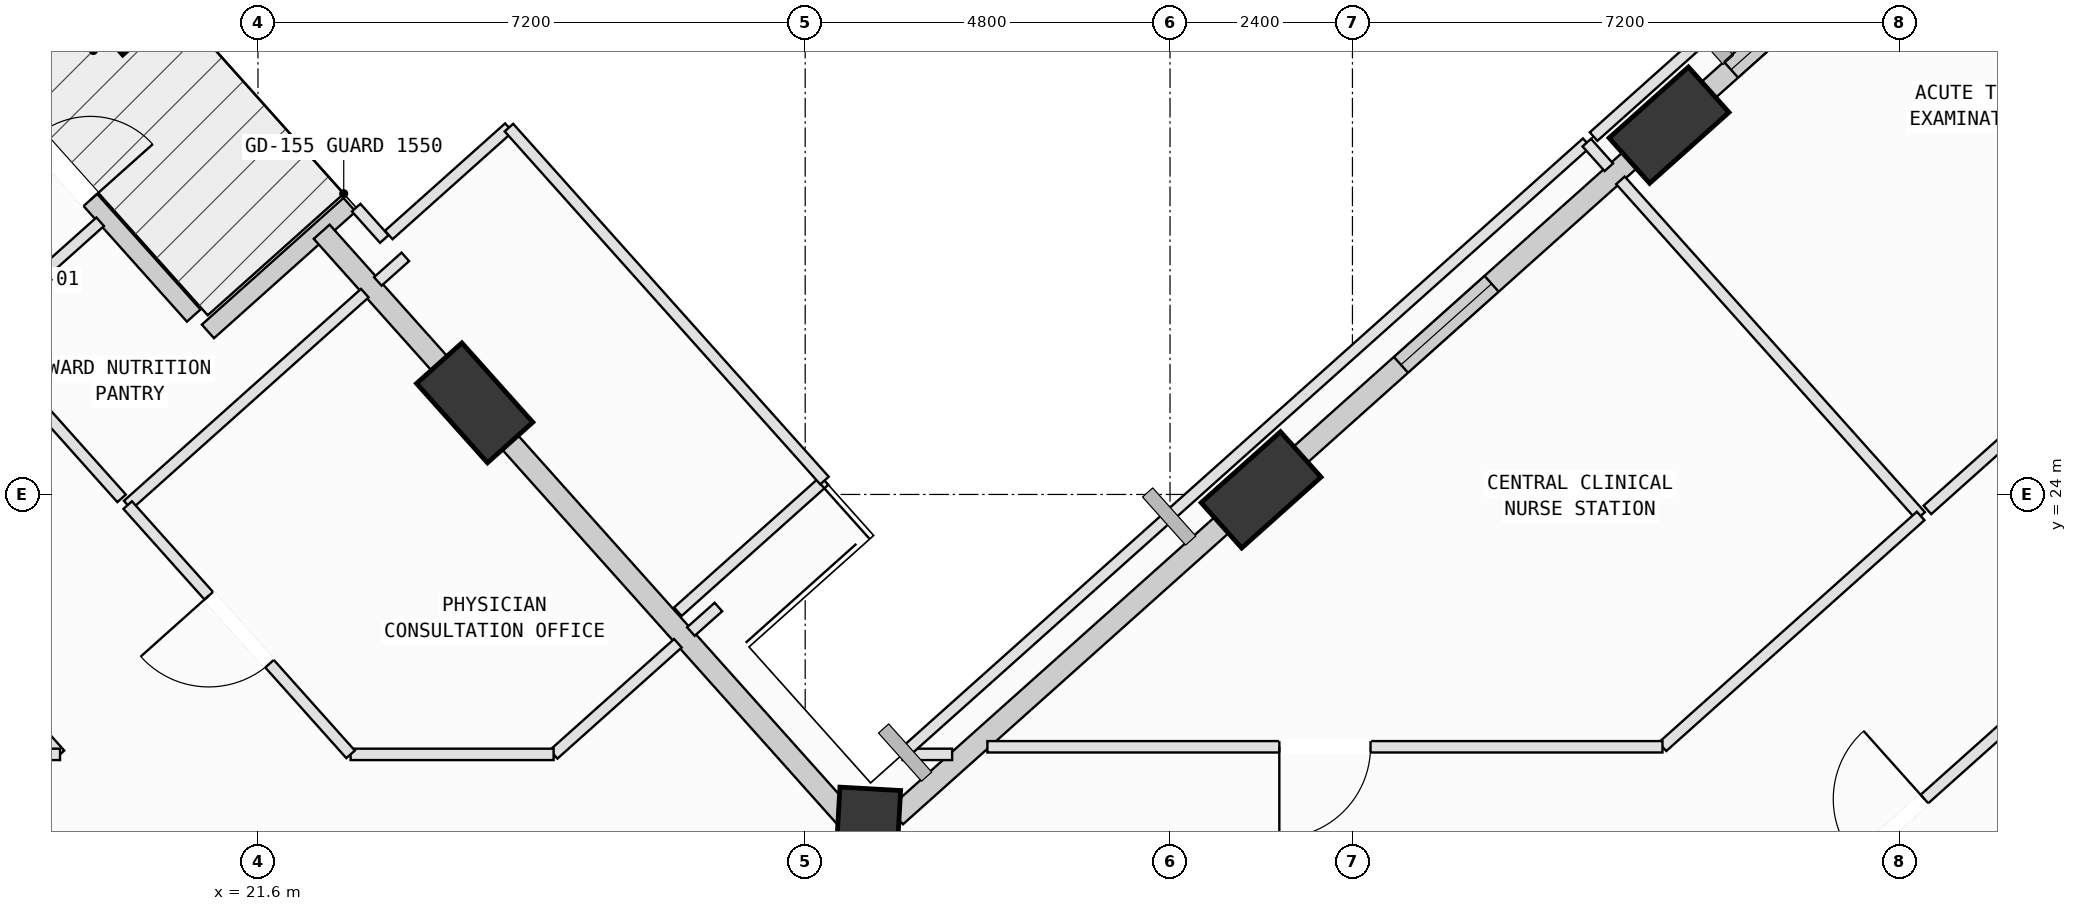
"""IFC4 building model, lengths in metres.
Left out: names, types, materials, properties, quantities, classifications, styles, units other than length and angle.
Written with IfcOpenShell. Run it as: python <this file> out.ifc"""

import sys

from ifc_helpers import new_model, si_unit, direction, frame, frame_2d, origin, origin_2d, place, context, subcontext, project, spatial, rectangle, extrude, element, fill, save


model = new_model("IFC4")
c1 = context("Model", 3, precision=1e-05, world=origin(), true_north=direction((0.0, 1.0)))
c2 = subcontext(c1, "Body", "Model", "MODEL_VIEW")
j1 = project(units=[si_unit("LENGTHUNIT", "METRE"), si_unit("PLANEANGLEUNIT", "RADIAN")], contexts=[c1])
p1 = place(None, origin())
s1 = spatial("IfcSite", under=j1, at=p1, CompositionType="ELEMENT")
p2 = place(p1, origin())
s2 = spatial("IfcBuilding", under=s1, at=p2, CompositionType="ELEMENT")
p3 = place(p2, frame((0.0, 0.0, 201.8)))
s3 = spatial("IfcBuildingStorey", under=s2, at=p3, CompositionType="ELEMENT", Elevation=201.8)
p4 = place(p3, frame((40.165, 28.859, 0.002), z_axis=(-0.017020693495, 0.027036480641, 0.999489532065), x_axis=(-0.275948140466, -0.960936612332, 0.021294385498)))
e1 = element("IfcColumn", 1, at=p4, inside=s3, PredefinedType="COLUMN", context=c2, shape_type="SweptSolid", body=[
    extrude(rectangle(XDim=1.4, YDim=0.8, at=origin_2d()), origin(), (0.0, 0.0, 1.0), 3.973),
])
p5 = place(p3, frame((34.798, 24.06, 0.002), z_axis=(0.002997258286, 0.004954651452, 0.999983233795), x_axis=(-0.982837456403, -0.184433286373, 0.003859685072)))
e2 = element("IfcColumn", 2, at=p5, inside=s3, PredefinedType="COLUMN", context=c2, shape_type="SweptSolid", body=[
    extrude(rectangle(XDim=1.4, YDim=0.8, at=origin_2d()), origin(), (0.0, 0.0, 1.0), 3.991),
])
p6 = place(p3, frame((29.617, 19.428, 0.002), z_axis=(0.022404649065, -0.016327771648, 0.999615643922), x_axis=(-0.773714259991, 0.632929754663, 0.027679767862)))
e3 = element("IfcColumn", 3, at=p6, inside=s3, PredefinedType="COLUMN", context=c2, shape_type="SweptSolid", body=[
    extrude(rectangle(XDim=1.4, YDim=0.8, at=origin_2d()), origin(), (0.0, 0.0, 1.0), 3.977),
])
p7 = place(p3, frame((24.451, 25.205, 0.002), z_axis=(-0.001414889016, -0.037894418868, 0.999280746891), x_axis=(-0.63827340517, 0.769290530465, 0.028269064174)))
e4 = element("IfcColumn", 4, at=p7, inside=s3, PredefinedType="COLUMN", context=c2, shape_type="SweptSolid", body=[
    extrude(rectangle(XDim=1.4, YDim=0.8, at=origin_2d()), origin(), (0.0, 0.0, 1.0), 3.969),
])
p8 = place(p3, frame((19.652, 30.573, 0.002), z_axis=(-0.023400018173, -0.057851759968, 0.998050907027), x_axis=(-0.338913817556, 0.939666525529, 0.046521447421)))
e5 = element("IfcColumn", 5, at=p8, inside=s3, PredefinedType="COLUMN", context=c2, shape_type="SweptSolid", body=[
    extrude(rectangle(XDim=1.4, YDim=0.8, at=origin_2d()), origin(), (0.0, 0.0, 1.0), 3.954),
])
p9 = place(p3, frame((16.116, 31.542, 0.0), z_axis=(0.0, 0.0, 1.0), x_axis=(0.666505663581, -0.745499966743, 0.0)))
e6 = element("IfcWall", 6, at=p9, inside=s3, PredefinedType="SOLIDWALL", context=c2, shape_type="SweptSolid", body=[
    extrude(rectangle(XDim=6.96, YDim=0.24, at=frame_2d((3.48, 0.0))), origin(), (0.0, 0.0, 1.0), 3.185),
])
p10 = place(p9, frame((3.82, 0.0, 0.0)))
e7 = element("IfcOpeningElement", 7, at=p10, cuts=e6, PredefinedType="OPENING", context=c2, shape_type="SweptSolid", body=[
    extrude(rectangle(XDim=1.1, YDim=2.15, at=frame_2d((0.55, 1.075))), frame((0.0, 0.13, 0.0), z_axis=(0.0, -1.0, 0.0), x_axis=(1.0, 0.0, 0.0)), (0.0, 0.0, 1.0), 0.26),
])
p11 = place(p3, frame((20.942, 26.145, 0.0), z_axis=(0.0, 0.0, 1.0), x_axis=(0.745504325209, 0.666500788518, 0.0)))
e8 = element("IfcWall", 8, at=p11, inside=s3, PredefinedType="SOLIDWALL", context=c2, shape_type="SweptSolid", body=[
    extrude(rectangle(XDim=2.5, YDim=0.24, at=frame_2d((1.25, 0.0))), origin(), (0.0, 0.0, 1.0), 3.185),
])
p12 = place(p3, frame((40.54, 29.194, 0.0), z_axis=(0.0, 0.0, 1.0), x_axis=(0.745469957375, 0.666539228141, 0.0)))
e9 = element("IfcWall", 9, at=p12, inside=s3, PredefinedType="SOLIDWALL", context=c2, shape_type="SweptSolid", body=[
    extrude(rectangle(XDim=6.226, YDim=0.28, at=frame_2d((3.113, 0.0))), origin(), (0.0, 0.0, 1.0), 2.985),
])
p13 = place(p12, frame((2.51, 0.0, 0.75)))
e10 = element("IfcOpeningElement", 10, at=p13, cuts=e9, PredefinedType="OPENING", context=c2, shape_type="SweptSolid", body=[
    extrude(rectangle(XDim=1.2, YDim=1.75, at=frame_2d((0.6, 0.875))), frame((0.0, 0.15, 0.0), z_axis=(0.0, -1.0, 0.0), x_axis=(1.0, 0.0, 0.0)), (0.0, 0.0, 1.0), 0.3),
])
p14 = place(p12, frame((0.591, 0.0, 0.75)))
e11 = element("IfcOpeningElement", 11, at=p14, cuts=e9, PredefinedType="OPENING", context=c2, shape_type="SweptSolid", body=[
    extrude(rectangle(XDim=1.2, YDim=1.75, at=frame_2d((0.6, 0.875))), frame((0.0, 0.15, 0.0), z_axis=(0.0, -1.0, 0.0), x_axis=(1.0, 0.0, 0.0)), (0.0, 0.0, 1.0), 0.3),
])
p15 = place(p3, frame((35.176, 24.398, 0.0), z_axis=(0.0, 0.0, 1.0), x_axis=(0.745469496109, 0.66653974403, 0.0)))
e12 = element("IfcWall", 12, at=p15, inside=s3, PredefinedType="SOLIDWALL", context=c2, shape_type="SweptSolid", body=[
    extrude(rectangle(XDim=6.211, YDim=0.28, at=frame_2d((3.105, 0.0))), origin(), (0.0, 0.0, 1.0), 3.185),
])
p16 = place(p15, frame((1.961, 0.0, 0.75)))
e13 = element("IfcOpeningElement", 13, at=p16, cuts=e12, PredefinedType="OPENING", context=c2, shape_type="SweptSolid", body=[
    extrude(rectangle(XDim=1.6, YDim=1.95, at=frame_2d((0.8, 0.975))), frame((0.0, 0.15, 0.0), z_axis=(0.0, -1.0, 0.0), x_axis=(1.0, 0.0, 0.0)), (0.0, 0.0, 1.0), 0.3),
])
p17 = place(p3, frame((29.993, 19.764, 0.0), z_axis=(0.0, 0.0, 1.0), x_axis=(0.745473758076, 0.666534977341, 0.0)))
e14 = element("IfcWall", 14, at=p17, inside=s3, PredefinedType="SOLIDWALL", context=c2, shape_type="SweptSolid", body=[
    extrude(rectangle(XDim=5.96, YDim=0.28, at=frame_2d((2.98, 0.0))), origin(), (0.0, 0.0, 1.0), 2.985),
])
p18 = place(p3, frame((29.323, 19.757, 0.0), z_axis=(0.0, 0.0, 1.0), x_axis=(-0.666530903335, 0.745477400663, 0.0)))
e15 = element("IfcWall", 15, at=p18, inside=s3, PredefinedType="SOLIDWALL", context=c2, shape_type="SweptSolid", body=[
    extrude(rectangle(XDim=6.76, YDim=0.28, at=frame_2d((3.38, 0.0))), origin(), (0.0, 0.0, 1.0), 3.185),
])
p19 = place(p3, frame((24.159, 25.532, 0.0), z_axis=(0.0, 0.0, 1.0), x_axis=(-0.666515579079, 0.745491101788, 0.0)))
e16 = element("IfcWall", 16, at=p19, inside=s3, PredefinedType="SOLIDWALL", context=c2, shape_type="SweptSolid", body=[
    extrude(rectangle(XDim=2.581, YDim=0.28, at=frame_2d((1.291, 0.0))), origin(), (0.0, 0.0, 1.0), 3.185),
])
p20 = place(p3, frame((38.516, 15.513, 0.0), z_axis=(0.0, 0.0, 1.0), x_axis=(0.745456187518, 0.666554628287, 0.0)))
e17 = element("IfcWall", 17, at=p20, inside=s3, PredefinedType="PARTITIONING", context=c2, shape_type="SweptSolid", body=[
    extrude(rectangle(XDim=12.241, YDim=0.15, at=frame_2d((6.12, 0.0))), origin(), (0.0, 0.0, 1.0), 3.7),
])
p21 = place(p20, frame((5.521, 0.0, 0.0)))
e18 = element("IfcOpeningElement", 18, at=p21, cuts=e17, PredefinedType="OPENING", context=c2, shape_type="SweptSolid", body=[
    extrude(rectangle(XDim=1.2, YDim=2.15, at=frame_2d((0.6, 1.075))), frame((0.0, 0.085, 0.0), z_axis=(0.0, -1.0, 0.0), x_axis=(1.0, 0.0, 0.0)), (0.0, 0.0, 1.0), 0.17),
])
p22 = place(p3, frame((12.256, 28.118, 0.0), z_axis=(0.0, 0.0, 1.0), x_axis=(0.666553455148, -0.745457236487, 0.0)))
e19 = element("IfcWall", 19, at=p22, inside=s3, PredefinedType="PARTITIONING", context=c2, shape_type="SweptSolid", body=[
    extrude(rectangle(XDim=10.112, YDim=0.15, at=frame_2d((5.056, 0.0))), origin(), (0.0, 0.0, 1.0), 3.7),
])
p23 = place(p22, frame((4.456, 0.0, 0.0)))
e20 = element("IfcOpeningElement", 20, at=p23, cuts=e19, PredefinedType="OPENING", context=c2, shape_type="SweptSolid", body=[
    extrude(rectangle(XDim=1.2, YDim=2.15, at=frame_2d((0.6, 1.075))), frame((0.0, 0.085, 0.0), z_axis=(0.0, -1.0, 0.0), x_axis=(1.0, 0.0, 0.0)), (0.0, 0.0, 1.0), 0.17),
])
p24 = place(p3, frame((18.996, 20.58, 0.0), z_axis=(0.0, 0.0, 1.0), x_axis=(-1.0, 0.0, 0.0)))
e21 = element("IfcWall", 21, at=p24, inside=s3, PredefinedType="PARTITIONING", context=c2, shape_type="SweptSolid", body=[
    extrude(rectangle(XDim=3.999, YDim=0.15, at=frame_2d((2.0, 0.0))), origin(), (0.0, 0.0, 1.0), 3.7),
])
p25 = place(p3, frame((30.733, 20.58, 0.0), z_axis=(0.0, 0.0, 1.0), x_axis=(-1.0, 0.0, 0.0)))
e22 = element("IfcWall", 22, at=p25, inside=s3, PredefinedType="PARTITIONING", context=c2, shape_type="SweptSolid", body=[
    extrude(rectangle(XDim=0.653, YDim=0.15, at=frame_2d((0.326, 0.0))), origin(), (0.0, 0.0, 1.0), 3.7),
])
p26 = place(p3, frame((30.08, 20.58, 0.0), z_axis=(0.0, 0.0, 1.0), x_axis=(0.745505625265, 0.666499334357, 0.0)))
e23 = element("IfcWall", 23, at=p26, inside=s3, PredefinedType="PARTITIONING", context=c2, shape_type="SweptSolid", body=[
    extrude(rectangle(XDim=12.076, YDim=0.15, at=frame_2d((6.038, 0.0))), origin(), (0.0, 0.0, 1.0), 3.7),
])
p27 = place(p3, frame((39.083, 28.629, 0.0), z_axis=(0.0, 0.0, 1.0), x_axis=(0.667008184931, -0.745050388387, 0.0)))
e24 = element("IfcWall", 24, at=p27, inside=s3, PredefinedType="PARTITIONING", context=c2, shape_type="SweptSolid", body=[
    extrude(rectangle(XDim=0.435, YDim=0.15, at=frame_2d((0.217, 0.0))), origin(), (0.0, 0.0, 1.0), 3.7),
])
p28 = place(p3, frame((39.526, 28.133, 0.0), z_axis=(0.0, 0.0, 1.0), x_axis=(0.666703315067, -0.745323211553, 0.0)))
e25 = element("IfcWall", 25, at=p28, inside=s3, PredefinedType="PARTITIONING", context=c2, shape_type="SweptSolid", body=[
    extrude(rectangle(XDim=5.925, YDim=0.15, at=frame_2d((2.962, 0.0))), origin(), (0.0, 0.0, 1.0), 3.7),
])
p29 = place(p3, frame((43.476, 23.717, 0.0), z_axis=(0.0, 0.0, 1.0), x_axis=(-0.745490689722, -0.66651603997, 0.0)))
e26 = element("IfcWall", 26, at=p29, inside=s3, PredefinedType="PARTITIONING", context=c2, shape_type="SweptSolid", body=[
    extrude(rectangle(XDim=4.557, YDim=0.15, at=frame_2d((2.278, 0.0))), origin(), (0.0, 0.0, 1.0), 3.7),
])
p30 = place(p3, frame((40.079, 20.68, 0.0), z_axis=(0.0, 0.0, 1.0), x_axis=(-1.0, 0.0, 0.0)))
e27 = element("IfcWall", 27, at=p30, inside=s3, PredefinedType="PARTITIONING", context=c2, shape_type="SweptSolid", body=[
    extrude(rectangle(XDim=8.882, YDim=0.15, at=frame_2d((4.441, 0.0))), origin(), (0.0, 0.0, 1.0), 3.7),
])
p31 = place(p30, frame((3.841, 0.0, 0.0)))
e28 = element("IfcOpeningElement", 28, at=p31, cuts=e27, PredefinedType="OPENING", context=c2, shape_type="SweptSolid", body=[
    extrude(rectangle(XDim=1.2, YDim=2.15, at=frame_2d((0.6, 1.075))), frame((0.0, 0.085, 0.0), z_axis=(0.0, -1.0, 0.0), x_axis=(1.0, 0.0, 0.0)), (0.0, 0.0, 1.0), 0.17),
])
p32 = place(p3, frame((54.902, 33.933, 0.0), z_axis=(0.0, 0.0, 1.0), x_axis=(-0.745495701488, -0.666510434324, 0.0)))
e29 = element("IfcWall", 29, at=p32, inside=s3, PredefinedType="PARTITIONING", context=c2, shape_type="SweptSolid", body=[
    extrude(rectangle(XDim=15.208, YDim=0.15, at=frame_2d((7.604, 0.0))), origin(), (0.0, 0.0, 1.0), 3.7),
])
p33 = place(p32, frame((7.004, 0.0, 0.0)))
e30 = element("IfcOpeningElement", 30, at=p33, cuts=e29, PredefinedType="OPENING", context=c2, shape_type="SweptSolid", body=[
    extrude(rectangle(XDim=1.2, YDim=2.15, at=frame_2d((0.6, 1.075))), frame((0.0, 0.085, 0.0), z_axis=(0.0, -1.0, 0.0), x_axis=(1.0, 0.0, 0.0)), (0.0, 0.0, 1.0), 0.17),
])
p34 = place(p3, frame((39.173, 28.709, 0.0), z_axis=(0.0, 0.0, 1.0), x_axis=(0.745462238393, 0.666547861095, 0.0)))
e31 = element("IfcWall", 31, at=p34, inside=s3, PredefinedType="PARTITIONING", context=c2, shape_type="SweptSolid", body=[
    extrude(rectangle(XDim=14.94, YDim=0.15, at=frame_2d((7.47, 0.0))), origin(), (0.0, 0.0, 1.0), 2.985),
])
p35 = place(p3, frame((19.886, 23.86, 0.0), z_axis=(0.0, 0.0, 1.0), x_axis=(0.745581471628, 0.666414487512, 0.0)))
e32 = element("IfcWall", 32, at=p35, inside=s3, PredefinedType="PARTITIONING", context=c2, shape_type="SweptSolid", body=[
    extrude(rectangle(XDim=4.185, YDim=0.15, at=frame_2d((2.092, 0.0))), origin(), (0.0, 0.0, 1.0), 3.7),
])
for number, where, z_axis, x_axis in (
    (33, (23.177, 26.803, 0.0), (0.0, 0.0, 1.0), (0.746, 0.666, 0.0)),
    (34, (27.658, 22.519, 0.0), (0.0, 0.0, 1.0), (-0.746, -0.666, 0.0)),
):
    element("IfcWall", number, at=place(p3, frame(where, z_axis=z_axis, x_axis=x_axis)), inside=s3, PredefinedType="PARTITIONING", context=c2, shape_type="SweptSolid", body=[
        extrude(rectangle(XDim=0.485, YDim=0.15, at=frame_2d((0.243, 0.0))), origin(), (0.0, 0.0, 1.0), 3.7),
    ])
p36 = place(p3, frame((27.125, 22.042, 0.0), z_axis=(0.0, 0.0, 1.0), x_axis=(-0.745465439353, -0.666544281148, 0.0)))
e35 = element("IfcWall", 35, at=p36, inside=s3, PredefinedType="PARTITIONING", context=c2, shape_type="SweptSolid", body=[
    extrude(rectangle(XDim=2.193, YDim=0.15, at=frame_2d((1.097, 0.0))), origin(), (0.0, 0.0, 1.0), 3.7),
])
p37 = place(p3, frame((25.49, 20.58, 0.0), z_axis=(0.0, 0.0, 1.0), x_axis=(-1.0, 0.0, 0.0)))
e36 = element("IfcWall", 36, at=p37, inside=s3, PredefinedType="PARTITIONING", context=c2, shape_type="SweptSolid", body=[
    extrude(rectangle(XDim=2.671, YDim=0.15, at=frame_2d((1.335, 0.0))), origin(), (0.0, 0.0, 1.0), 3.7),
])
p38 = place(p3, frame((22.819, 20.58, 0.0), z_axis=(0.0, 0.0, 1.0), x_axis=(-0.66658561557, 0.745428478873, 0.0)))
e37 = element("IfcWall", 37, at=p38, inside=s3, PredefinedType="PARTITIONING", context=c2, shape_type="SweptSolid", body=[
    extrude(rectangle(XDim=4.4, YDim=0.15, at=frame_2d((2.2, 0.0))), origin(), (0.0, 0.0, 1.0), 3.7),
])
p39 = place(p38, frame((1.6, 0.0, 0.0)))
e38 = element("IfcOpeningElement", 38, at=p39, cuts=e37, PredefinedType="OPENING", context=c2, shape_type="SweptSolid", body=[
    extrude(rectangle(XDim=1.2, YDim=2.15, at=frame_2d((0.6, 1.075))), frame((0.0, 0.085, 0.0), z_axis=(0.0, -1.0, 0.0), x_axis=(1.0, 0.0, 0.0)), (0.0, 0.0, 1.0), 0.17),
])
p40 = place(p3, frame((19.806, 23.949, 0.0), z_axis=(0.0, 0.0, 1.0), x_axis=(-0.666490112364, 0.745513869838, 0.0)))
e39 = element("IfcWall", 39, at=p40, inside=s3, PredefinedType="PARTITIONING", context=c2, shape_type="SweptSolid", body=[
    extrude(rectangle(XDim=5.481, YDim=0.15, at=frame_2d((2.74, 0.0))), origin(), (0.0, 0.0, 1.0), 3.7),
])
p41 = place(p40, frame((2.281, 0.0, 0.0)))
e40 = element("IfcOpeningElement", 40, at=p41, cuts=e39, PredefinedType="OPENING", context=c2, shape_type="SweptSolid", body=[
    extrude(rectangle(XDim=0.92, YDim=2.1, at=frame_2d((0.46, 1.05))), frame((0.0, 0.085, 0.0), z_axis=(0.0, -1.0, 0.0), x_axis=(1.0, 0.0, 0.0)), (0.0, 0.0, 1.0), 0.17),
])
p42 = place(p3, frame((18.738, 26.885, 0.0), z_axis=(0.0, 0.0, 1.0), x_axis=(0.745374531652, 0.666645938685, 0.0)))
e41 = element("IfcWall", 41, at=p42, inside=s3, PredefinedType="PARTITIONING", context=c2, shape_type="SweptSolid", body=[
    extrude(rectangle(XDim=1.054, YDim=0.15, at=frame_2d((0.527, 0.0))), origin(), (0.0, 0.0, 1.0), 3.7),
])
p43 = place(p3, frame((22.892, 27.774, 0.0), z_axis=(0.0, 0.0, 1.0), x_axis=(0.667283955709, -0.74480341195, 0.0)))
e42 = element("IfcWall", 42, at=p43, inside=s3, PredefinedType="PARTITIONING", context=c2, shape_type="SweptSolid", body=[
    extrude(rectangle(XDim=0.554, YDim=0.15, at=frame_2d((0.277, 0.0))), origin(), (0.0, 0.0, 1.0), 3.7),
])
p44 = place(p3, frame((29.054, 24.183, 0.0), z_axis=(0.0, 0.0, 1.0), x_axis=(-0.745376933281, -0.666643253422, 0.0)))
e43 = element("IfcWall", 43, at=p44, inside=s3, PredefinedType="PARTITIONING", context=c2, shape_type="SweptSolid", body=[
    extrude(rectangle(XDim=2.589, YDim=0.15, at=frame_2d((1.294, 0.0))), origin(), (0.0, 0.0, 1.0), 3.7),
])
p45 = place(p3, frame((23.321, 27.414, 0.0), z_axis=(0.0, 0.0, 1.0), x_axis=(0.745659752228, 0.666326897181, 0.0)))
e44 = element("IfcWall", 44, at=p45, inside=s3, PredefinedType="PARTITIONING", context=c2, shape_type="SweptSolid", body=[
    extrude(rectangle(XDim=2.12, YDim=0.15, at=frame_2d((1.06, 0.0))), origin(), (0.0, 0.0, 1.0), 3.7),
])
p46 = place(p3, frame((24.902, 28.827, 0.0), z_axis=(0.0, 0.0, 1.0), x_axis=(0.666516421942, -0.745490348215, 0.0)))
e45 = element("IfcWall", 45, at=p46, inside=s3, PredefinedType="PARTITIONING", context=c2, shape_type="SweptSolid", body=[
    extrude(rectangle(XDim=6.229, YDim=0.15, at=frame_2d((3.115, 0.0))), origin(), (0.0, 0.0, 1.0), 3.7),
])
p47 = place(p10, origin())
e46 = element("IfcDoor", 46, at=p47, inside=s3, OperationType="SINGLE_SWING_RIGHT", PredefinedType="DOOR", context=c2, shape_type="SweptSolid", body=[
    extrude(rectangle(XDim=1.1, YDim=2.15, at=frame_2d((0.55, 1.075))), frame((0.0, 0.025, 0.0), z_axis=(0.0, -1.0, 0.0), x_axis=(1.0, 0.0, 0.0)), (0.0, 0.0, 1.0), 0.05),
])
fill(e7, e46)
p48 = place(p14, origin())
e47 = element("IfcWindow", 47, at=p48, inside=s3, PartitioningType="SINGLE_PANEL", PredefinedType="WINDOW", context=c2, shape_type="SweptSolid", body=[
    extrude(rectangle(XDim=1.2, YDim=1.75, at=frame_2d((0.6, 0.875))), frame((0.0, 0.03, 0.0), z_axis=(0.0, -1.0, 0.0), x_axis=(1.0, 0.0, 0.0)), (0.0, 0.0, 1.0), 0.06),
])
fill(e11, e47)
p49 = place(p16, origin())
e48 = element("IfcWindow", 48, at=p49, inside=s3, PartitioningType="SINGLE_PANEL", PredefinedType="WINDOW", context=c2, shape_type="SweptSolid", body=[
    extrude(rectangle(XDim=1.6, YDim=1.95, at=frame_2d((0.8, 0.975))), frame((0.0, 0.03, 0.0), z_axis=(0.0, -1.0, 0.0), x_axis=(1.0, 0.0, 0.0)), (0.0, 0.0, 1.0), 0.06),
])
fill(e13, e48)
p50 = place(p21, origin())
e49 = element("IfcDoor", 49, at=p50, inside=s3, OperationType="SINGLE_SWING_RIGHT", PredefinedType="DOOR", context=c2, shape_type="SweptSolid", body=[
    extrude(rectangle(XDim=1.2, YDim=2.15, at=frame_2d((0.6, 1.075))), frame((0.0, 0.025, 0.0), z_axis=(0.0, -1.0, 0.0), x_axis=(1.0, 0.0, 0.0)), (0.0, 0.0, 1.0), 0.05),
])
fill(e18, e49)
p51 = place(p31, origin())
e50 = element("IfcDoor", 50, at=p51, inside=s3, OperationType="SINGLE_SWING_RIGHT", PredefinedType="DOOR", context=c2, shape_type="SweptSolid", body=[
    extrude(rectangle(XDim=1.2, YDim=2.15, at=frame_2d((0.6, 1.075))), frame((0.0, 0.025, 0.0), z_axis=(0.0, -1.0, 0.0), x_axis=(1.0, 0.0, 0.0)), (0.0, 0.0, 1.0), 0.05),
])
fill(e28, e50)
p52 = place(p39, origin())
e51 = element("IfcDoor", 51, at=p52, inside=s3, OperationType="SINGLE_SWING_RIGHT", PredefinedType="DOOR", context=c2, shape_type="SweptSolid", body=[
    extrude(rectangle(XDim=1.2, YDim=2.15, at=frame_2d((0.6, 1.075))), frame((0.0, 0.025, 0.0), z_axis=(0.0, -1.0, 0.0), x_axis=(1.0, 0.0, 0.0)), (0.0, 0.0, 1.0), 0.05),
])
fill(e38, e51)
save(model, sys.argv[1])
